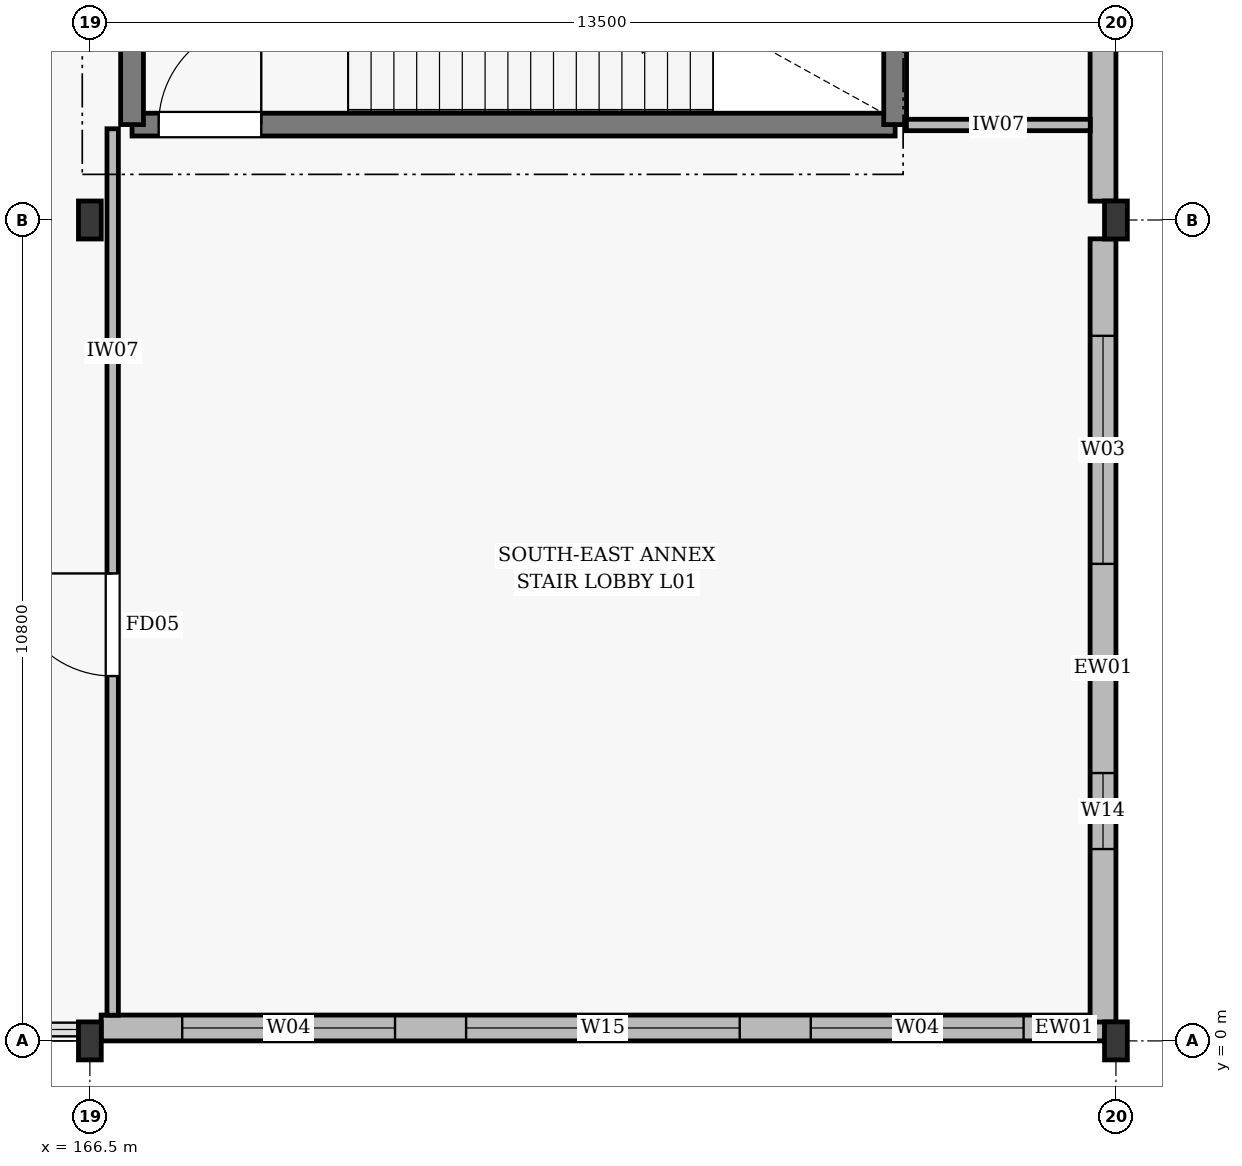
"""IFC4 building model, lengths in metres.
Left out: names, types, materials, properties, quantities, classifications, styles, units other than length and angle.
Written with IfcOpenShell. Run it as: python <this file> out.ifc"""

import sys

from ifc_helpers import new_model, si_unit, direction, frame, frame_2d, origin, origin_2d, place, context, subcontext, project, spatial, rectangle, i_section, extrude, element, fill, save


model = new_model("IFC4")
c1 = context("Model", 3, precision=1e-05, world=origin(), true_north=direction((0.0, 1.0)))
c2 = subcontext(c1, "Body", "Model", "MODEL_VIEW")
j1 = project(units=[si_unit("LENGTHUNIT", "METRE"), si_unit("PLANEANGLEUNIT", "RADIAN")], contexts=[c1])
p1 = place(None, origin())
s1 = spatial("IfcSite", under=j1, at=p1, CompositionType="ELEMENT")
p2 = place(p1, origin())
s2 = spatial("IfcBuilding", under=s1, at=p2, CompositionType="ELEMENT")
p3 = place(p2, frame((0.0, 0.0, 6.6)))
s3 = spatial("IfcBuildingStorey", under=s2, at=p3, CompositionType="ELEMENT", Elevation=6.6)
for number, where, z_axis, x_axis in (
    (1, (166.5, 0.0, 0.0), (0.0, 0.0, 1.0), (1.0, 0.0, 0.0)),
    (2, (166.5, 10.8, 0.0), (0.0, 0.0, 1.0), (1.0, 0.0, 0.0)),
    (3, (180.0, 0.0, 0.0), (0.0, 0.0, 1.0), (1.0, 0.0, 0.0)),
    (4, (180.0, 10.8, 0.0), (0.0, 0.0, 1.0), (1.0, 0.0, 0.0)),
):
    element("IfcColumn", number, at=place(p3, frame(where, z_axis=z_axis, x_axis=x_axis)), inside=s3, PredefinedType="COLUMN", context=c2, shape_type="SweptSolid", body=[
        extrude(i_section(OverallWidth=0.3, OverallDepth=0.5, WebThickness=0.014, FlangeThickness=0.028, at=origin_2d()), origin(), (0.0, 0.0, 1.0), 6.0),
    ])
p4 = place(p3, frame((166.648, 0.17, 0.0), z_axis=(0.0, 0.0, 1.0), x_axis=(1.0, 0.0, 0.0)))
e5 = element("IfcWall", 5, at=p4, inside=s3, PredefinedType="STANDARD", context=c2, shape_type="SweptSolid", body=[
    extrude(rectangle(XDim=13.204, YDim=0.34, at=frame_2d((6.602, 0.0))), origin(), (0.0, 0.0, 1.0), 5.15),
])
p5 = place(p4, frame((1.067, 0.0, 0.75)))
e6 = element("IfcOpeningElement", 6, at=p5, cuts=e5, PredefinedType="OPENING", context=c2, shape_type="SweptSolid", body=[
    extrude(rectangle(XDim=2.8, YDim=2.6, at=frame_2d((1.4, 1.3))), frame((0.0, 0.182, 0.0), z_axis=(0.0, -1.0, 0.0), x_axis=(1.0, 0.0, 0.0)), (0.0, 0.0, 1.0), 0.364),
])
p6 = place(p4, frame((4.802, 0.0, 1.05)))
e7 = element("IfcOpeningElement", 7, at=p6, cuts=e5, PredefinedType="OPENING", context=c2, shape_type="SweptSolid", body=[
    extrude(rectangle(XDim=3.6, YDim=1.4, at=frame_2d((1.8, 0.7))), frame((0.0, 0.182, 0.0), z_axis=(0.0, -1.0, 0.0), x_axis=(1.0, 0.0, 0.0)), (0.0, 0.0, 1.0), 0.364),
])
p7 = place(p4, frame((9.337, 0.0, 0.75)))
e8 = element("IfcOpeningElement", 8, at=p7, cuts=e5, PredefinedType="OPENING", context=c2, shape_type="SweptSolid", body=[
    extrude(rectangle(XDim=2.8, YDim=2.6, at=frame_2d((1.4, 1.3))), frame((0.0, 0.182, 0.0), z_axis=(0.0, -1.0, 0.0), x_axis=(1.0, 0.0, 0.0)), (0.0, 0.0, 1.0), 0.364),
])
p8 = place(p3, frame((179.83, 10.552, 0.0), z_axis=(0.0, 0.0, 1.0), x_axis=(0.0, -1.0, 0.0)))
e9 = element("IfcWall", 9, at=p8, inside=s3, PredefinedType="STANDARD", context=c2, shape_type="SweptSolid", body=[
    extrude(rectangle(XDim=10.304, YDim=0.34, at=frame_2d((5.152, 0.0))), origin(), (0.0, 0.0, 1.0), 5.15),
])
p9 = place(p8, frame((1.276, 0.0, 0.75)))
e10 = element("IfcOpeningElement", 10, at=p9, cuts=e9, PredefinedType="OPENING", context=c2, shape_type="SweptSolid", body=[
    extrude(rectangle(XDim=3.0, YDim=2.6, at=frame_2d((1.5, 1.3))), frame((0.0, 0.182, 0.0), z_axis=(0.0, -1.0, 0.0), x_axis=(1.0, 0.0, 0.0)), (0.0, 0.0, 1.0), 0.364),
])
p10 = place(p8, frame((7.028, 0.0, 1.05)))
e11 = element("IfcOpeningElement", 11, at=p10, cuts=e9, PredefinedType="OPENING", context=c2, shape_type="SweptSolid", body=[
    extrude(rectangle(XDim=1.0, YDim=1.6, at=frame_2d((0.5, 0.8))), frame((0.0, 0.182, 0.0), z_axis=(0.0, -1.0, 0.0), x_axis=(1.0, 0.0, 0.0)), (0.0, 0.0, 1.0), 0.364),
])
p11 = place(p3, frame((179.83, 21.352, 0.0), z_axis=(0.0, 0.0, 1.0), x_axis=(0.0, -1.0, 0.0)))
e12 = element("IfcWall", 12, at=p11, inside=s3, PredefinedType="STANDARD", context=c2, shape_type="SweptSolid", body=[
    extrude(rectangle(XDim=10.304, YDim=0.34, at=frame_2d((5.152, 0.0))), origin(), (0.0, 0.0, 1.0), 5.09),
])
p12 = place(p11, frame((1.276, 0.0, 0.75)))
e13 = element("IfcOpeningElement", 13, at=p12, cuts=e12, PredefinedType="OPENING", context=c2, shape_type="SweptSolid", body=[
    extrude(rectangle(XDim=3.0, YDim=2.6, at=frame_2d((1.5, 1.3))), frame((0.0, 0.182, 0.0), z_axis=(0.0, -1.0, 0.0), x_axis=(1.0, 0.0, 0.0)), (0.0, 0.0, 1.0), 0.364),
])
p13 = place(p11, frame((7.028, 0.0, 1.05)))
e14 = element("IfcOpeningElement", 14, at=p13, cuts=e12, PredefinedType="OPENING", context=c2, shape_type="SweptSolid", body=[
    extrude(rectangle(XDim=1.0, YDim=1.6, at=frame_2d((0.5, 0.8))), frame((0.0, 0.182, 0.0), z_axis=(0.0, -1.0, 0.0), x_axis=(1.0, 0.0, 0.0)), (0.0, 0.0, 1.0), 0.364),
])
p14 = place(p3, frame((167.055, 12.055, 0.0), z_axis=(0.0, 0.0, 1.0), x_axis=(1.0, 0.0, 0.0)))
e15 = element("IfcWall", 15, at=p14, inside=s3, PredefinedType="SOLIDWALL", context=c2, shape_type="SweptSolid", body=[
    extrude(rectangle(XDim=10.04, YDim=0.3, at=frame_2d((5.02, 0.0))), origin(), (0.0, 0.0, 1.0), 6.0),
])
p15 = place(p14, frame((0.35, 0.0, 0.005)))
e16 = element("IfcOpeningElement", 16, at=p15, cuts=e15, PredefinedType="OPENING", context=c2, shape_type="SweptSolid", body=[
    extrude(rectangle(XDim=1.35, YDim=2.15, at=frame_2d((0.675, 1.075))), frame((0.0, 0.162, 0.0), z_axis=(0.0, -1.0, 0.0), x_axis=(1.0, 0.0, 0.0)), (0.0, 0.0, 1.0), 0.324),
])
for number, where, z_axis, x_axis in (
    (17, (167.055, 12.055, 0.0), (0.0, 0.0, 1.0), (0.0, 1.0, 0.0)),
    (18, (177.095, 12.055, 0.0), (0.0, 0.0, 1.0), (0.0, 1.0, 0.0)),
):
    element("IfcWall", number, at=place(p3, frame(where, z_axis=z_axis, x_axis=x_axis)), inside=s3, PredefinedType="SOLIDWALL", context=c2, shape_type="SweptSolid", body=[
        extrude(rectangle(XDim=4.19, YDim=0.3, at=frame_2d((2.095, 0.0))), origin(), (0.0, 0.0, 1.0), 6.0),
    ])
p16 = place(p3, frame((166.8, 0.338, 0.0), z_axis=(0.0, 0.0, 1.0), x_axis=(0.0, 1.0, 0.0)))
e19 = element("IfcWall", 19, at=p16, inside=s3, PredefinedType="PARTITIONING", context=c2, shape_type="SweptSolid", body=[
    extrude(rectangle(XDim=11.662, YDim=0.15, at=frame_2d((5.831, 0.0))), origin(), (0.0, 0.0, 1.0), 5.14),
])
p17 = place(p16, frame((4.462, 0.0, 0.005)))
e20 = element("IfcOpeningElement", 20, at=p17, cuts=e19, PredefinedType="OPENING", context=c2, shape_type="SweptSolid", body=[
    extrude(rectangle(XDim=1.35, YDim=2.15, at=frame_2d((0.675, 1.075))), frame((0.0, 0.087, 0.0), z_axis=(0.0, -1.0, 0.0), x_axis=(1.0, 0.0, 0.0)), (0.0, 0.0, 1.0), 0.174),
])
p18 = place(p3, frame((177.243, 12.05, 0.0), z_axis=(0.0, 0.0, 1.0), x_axis=(1.0, 0.0, 0.0)))
e21 = element("IfcWall", 21, at=p18, inside=s3, PredefinedType="PARTITIONING", context=c2, shape_type="SweptSolid", body=[
    extrude(rectangle(XDim=2.419, YDim=0.15, at=frame_2d((1.209, 0.0))), origin(), (0.0, 0.0, 1.0), 5.38),
])
p19 = place(p5, origin())
e22 = element("IfcWindow", 22, at=p19, inside=s3, PartitioningType="DOUBLE_PANEL_VERTICAL", PredefinedType="WINDOW", context=c2, shape_type="SweptSolid", body=[
    extrude(rectangle(XDim=2.8, YDim=2.6, at=frame_2d((1.4, 1.3))), frame((0.0, 0.03, 0.0), z_axis=(0.0, -1.0, 0.0), x_axis=(1.0, 0.0, 0.0)), (0.0, 0.0, 1.0), 0.06),
])
fill(e6, e22)
p20 = place(p6, origin())
e23 = element("IfcWindow", 23, at=p20, inside=s3, PartitioningType="DOUBLE_PANEL_VERTICAL", PredefinedType="WINDOW", context=c2, shape_type="SweptSolid", body=[
    extrude(rectangle(XDim=3.6, YDim=1.4, at=frame_2d((1.8, 0.7))), frame((0.0, 0.03, 0.0), z_axis=(0.0, -1.0, 0.0), x_axis=(1.0, 0.0, 0.0)), (0.0, 0.0, 1.0), 0.06),
])
fill(e7, e23)
p21 = place(p7, origin())
e24 = element("IfcWindow", 24, at=p21, inside=s3, PartitioningType="DOUBLE_PANEL_VERTICAL", PredefinedType="WINDOW", context=c2, shape_type="SweptSolid", body=[
    extrude(rectangle(XDim=2.8, YDim=2.6, at=frame_2d((1.4, 1.3))), frame((0.0, 0.03, 0.0), z_axis=(0.0, -1.0, 0.0), x_axis=(1.0, 0.0, 0.0)), (0.0, 0.0, 1.0), 0.06),
])
fill(e8, e24)
p22 = place(p9, origin())
e25 = element("IfcWindow", 25, at=p22, inside=s3, PartitioningType="DOUBLE_PANEL_VERTICAL", PredefinedType="WINDOW", context=c2, shape_type="SweptSolid", body=[
    extrude(rectangle(XDim=3.0, YDim=2.6, at=frame_2d((1.5, 1.3))), frame((0.0, 0.03, 0.0), z_axis=(0.0, -1.0, 0.0), x_axis=(1.0, 0.0, 0.0)), (0.0, 0.0, 1.0), 0.06),
])
fill(e10, e25)
p23 = place(p10, origin())
e26 = element("IfcWindow", 26, at=p23, inside=s3, PartitioningType="DOUBLE_PANEL_VERTICAL", PredefinedType="WINDOW", context=c2, shape_type="SweptSolid", body=[
    extrude(rectangle(XDim=1.0, YDim=1.6, at=frame_2d((0.5, 0.8))), frame((0.0, 0.03, 0.0), z_axis=(0.0, -1.0, 0.0), x_axis=(1.0, 0.0, 0.0)), (0.0, 0.0, 1.0), 0.06),
])
fill(e11, e26)
p24 = place(p15, origin())
e27 = element("IfcDoor", 27, at=p24, inside=s3, OperationType="SINGLE_SWING_RIGHT", PredefinedType="DOOR", context=c2, shape_type="SweptSolid", body=[
    extrude(rectangle(XDim=1.35, YDim=2.15, at=frame_2d((0.675, 1.075))), frame((0.0, 0.025, 0.0), z_axis=(0.0, -1.0, 0.0), x_axis=(1.0, 0.0, 0.0)), (0.0, 0.0, 1.0), 0.05),
])
fill(e16, e27)
p25 = place(p17, origin())
e28 = element("IfcDoor", 28, at=p25, inside=s3, OperationType="SINGLE_SWING_RIGHT", PredefinedType="DOOR", context=c2, shape_type="SweptSolid", body=[
    extrude(rectangle(XDim=1.35, YDim=2.15, at=frame_2d((0.675, 1.075))), frame((0.0, 0.025, 0.0), z_axis=(0.0, -1.0, 0.0), x_axis=(1.0, 0.0, 0.0)), (0.0, 0.0, 1.0), 0.05),
])
fill(e20, e28)
save(model, sys.argv[1])
